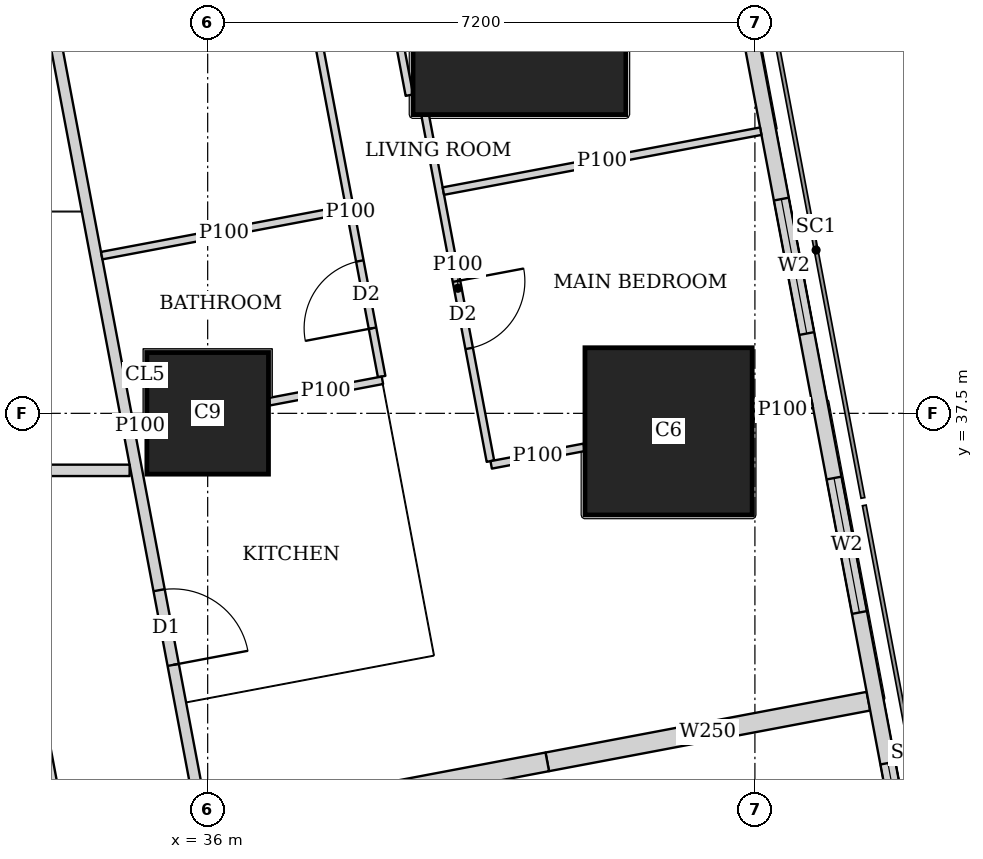
"""IFC4 building model, lengths in metres.
Left out: names, types, materials, properties, quantities, classifications, styles, units other than length and angle.
Written with IfcOpenShell. Run it as: python <this file> out.ifc"""

import sys

from ifc_helpers import new_model, si_unit, direction, frame, frame_2d, origin, origin_2d, place, context, subcontext, project, spatial, rectangle, extrude, element, fill, save


model = new_model("IFC4")
c1 = context("Model", 3, precision=1e-05, world=origin(), true_north=direction((0.0, 1.0)))
c2 = subcontext(c1, "Body", "Model", "MODEL_VIEW")
j1 = project(units=[si_unit("LENGTHUNIT", "METRE"), si_unit("PLANEANGLEUNIT", "RADIAN")], contexts=[c1])
p1 = place(None, origin())
s1 = spatial("IfcSite", under=j1, at=p1, CompositionType="ELEMENT")
p2 = place(p1, origin())
s2 = spatial("IfcBuilding", under=s1, at=p2, CompositionType="ELEMENT")
p3 = place(p2, frame((0.0, 0.0, 122.9)))
s3 = spatial("IfcBuildingStorey", under=s2, at=p3, CompositionType="ELEMENT", Elevation=122.9)
p4 = place(p3, frame((36.0, 37.5, 0.0), z_axis=(0.0, 0.0, 1.0), x_axis=(1.0, 0.0, 0.0)))
e1 = element("IfcColumn", 1, at=p4, inside=s3, PredefinedType="COLUMN", context=c2, shape_type="SweptSolid", body=[
    extrude(rectangle(XDim=1.6, YDim=1.6, at=origin_2d()), origin(), (0.0, 0.0, 1.0), 3.75),
])
p5 = place(p3, frame((42.064, 37.263, 0.0), z_axis=(0.0, 0.0, 1.0), x_axis=(1.0, 0.0, 0.0)))
e2 = element("IfcColumn", 2, at=p5, inside=s3, PredefinedType="COLUMN", context=c2, shape_type="SweptSolid", body=[
    extrude(rectangle(XDim=2.2, YDim=2.2, at=origin_2d()), origin(), (0.0, 0.0, 1.0), 3.75),
])
p6 = place(p3, frame((40.102, 42.83, 0.0), z_axis=(0.0, 0.0, 1.0), x_axis=(1.0, 0.0, 0.0)))
e3 = element("IfcColumn", 3, at=p6, inside=s3, PredefinedType="COLUMN", context=c2, shape_type="SweptSolid", body=[
    extrude(rectangle(XDim=2.8, YDim=2.8, at=origin_2d()), origin(), (0.0, 0.0, 1.0), 3.75),
])
p7 = place(p3, frame((50.653, 2.703, 0.0), z_axis=(0.0, 0.0, 1.0), x_axis=(-0.185612026696, 0.982623109613, 0.0)))
e4 = element("IfcWall", 4, at=p7, inside=s3, PredefinedType="SOLIDWALL", context=c2, shape_type="SweptSolid", body=[
    extrude(rectangle(XDim=41.393, YDim=0.2, at=frame_2d((20.697, 0.0))), origin(), (0.0, 0.0, 1.0), 3.5),
])
p8 = place(p7, frame((1.633, 0.0, 0.9)))
e5 = element("IfcOpeningElement", 5, at=p8, cuts=e4, PredefinedType="OPENING", context=c2, shape_type="SweptSolid", body=[
    extrude(rectangle(XDim=1.8, YDim=1.5, at=frame_2d((0.9, 0.75))), frame((0.0, 0.11, 0.0), z_axis=(0.0, -1.0, 0.0), x_axis=(1.0, 0.0, 0.0)), (0.0, 0.0, 1.0), 0.22),
])
p9 = place(p7, frame((6.032, 0.0, 0.9)))
e6 = element("IfcOpeningElement", 6, at=p9, cuts=e4, PredefinedType="OPENING", context=c2, shape_type="SweptSolid", body=[
    extrude(rectangle(XDim=1.8, YDim=1.5, at=frame_2d((0.9, 0.75))), frame((0.0, 0.11, 0.0), z_axis=(0.0, -1.0, 0.0), x_axis=(1.0, 0.0, 0.0)), (0.0, 0.0, 1.0), 0.22),
])
p10 = place(p7, frame((9.848, 0.0, 0.9)))
e7 = element("IfcOpeningElement", 7, at=p10, cuts=e4, PredefinedType="OPENING", context=c2, shape_type="SweptSolid", body=[
    extrude(rectangle(XDim=1.8, YDim=1.5, at=frame_2d((0.9, 0.75))), frame((0.0, 0.11, 0.0), z_axis=(0.0, -1.0, 0.0), x_axis=(1.0, 0.0, 0.0)), (0.0, 0.0, 1.0), 0.22),
])
p11 = place(p7, frame((13.664, 0.0, 0.9)))
e8 = element("IfcOpeningElement", 8, at=p11, cuts=e4, PredefinedType="OPENING", context=c2, shape_type="SweptSolid", body=[
    extrude(rectangle(XDim=1.8, YDim=1.5, at=frame_2d((0.9, 0.75))), frame((0.0, 0.11, 0.0), z_axis=(0.0, -1.0, 0.0), x_axis=(1.0, 0.0, 0.0)), (0.0, 0.0, 1.0), 0.22),
])
p12 = place(p7, frame((17.481, 0.0, 0.9)))
e9 = element("IfcOpeningElement", 9, at=p12, cuts=e4, PredefinedType="OPENING", context=c2, shape_type="SweptSolid", body=[
    extrude(rectangle(XDim=1.8, YDim=1.5, at=frame_2d((0.9, 0.75))), frame((0.0, 0.11, 0.0), z_axis=(0.0, -1.0, 0.0), x_axis=(1.0, 0.0, 0.0)), (0.0, 0.0, 1.0), 0.22),
])
p13 = place(p7, frame((21.297, 0.0, 0.9)))
e10 = element("IfcOpeningElement", 10, at=p13, cuts=e4, PredefinedType="OPENING", context=c2, shape_type="SweptSolid", body=[
    extrude(rectangle(XDim=1.8, YDim=1.5, at=frame_2d((0.9, 0.75))), frame((0.0, 0.11, 0.0), z_axis=(0.0, -1.0, 0.0), x_axis=(1.0, 0.0, 0.0)), (0.0, 0.0, 1.0), 0.22),
])
p14 = place(p7, frame((25.113, 0.0, 0.9)))
e11 = element("IfcOpeningElement", 11, at=p14, cuts=e4, PredefinedType="OPENING", context=c2, shape_type="SweptSolid", body=[
    extrude(rectangle(XDim=1.8, YDim=1.5, at=frame_2d((0.9, 0.75))), frame((0.0, 0.11, 0.0), z_axis=(0.0, -1.0, 0.0), x_axis=(1.0, 0.0, 0.0)), (0.0, 0.0, 1.0), 0.22),
])
p15 = place(p7, frame((28.93, 0.0, 0.9)))
e12 = element("IfcOpeningElement", 12, at=p15, cuts=e4, PredefinedType="OPENING", context=c2, shape_type="SweptSolid", body=[
    extrude(rectangle(XDim=1.8, YDim=1.5, at=frame_2d((0.9, 0.75))), frame((0.0, 0.11, 0.0), z_axis=(0.0, -1.0, 0.0), x_axis=(1.0, 0.0, 0.0)), (0.0, 0.0, 1.0), 0.22),
])
p16 = place(p7, frame((32.746, 0.0, 0.9)))
e13 = element("IfcOpeningElement", 13, at=p16, cuts=e4, PredefinedType="OPENING", context=c2, shape_type="SweptSolid", body=[
    extrude(rectangle(XDim=1.8, YDim=1.5, at=frame_2d((0.9, 0.75))), frame((0.0, 0.11, 0.0), z_axis=(0.0, -1.0, 0.0), x_axis=(1.0, 0.0, 0.0)), (0.0, 0.0, 1.0), 0.22),
])
p17 = place(p7, frame((36.481, 0.0, 0.9)))
e14 = element("IfcOpeningElement", 14, at=p17, cuts=e4, PredefinedType="OPENING", context=c2, shape_type="SweptSolid", body=[
    extrude(rectangle(XDim=1.8, YDim=1.5, at=frame_2d((0.9, 0.75))), frame((0.0, 0.11, 0.0), z_axis=(0.0, -1.0, 0.0), x_axis=(1.0, 0.0, 0.0)), (0.0, 0.0, 1.0), 0.22),
])
p18 = place(p3, frame((29.601, 36.75, 0.0), z_axis=(0.0, 0.0, 1.0), x_axis=(1.0, 0.0, 0.0)))
e15 = element("IfcWall", 15, at=p18, inside=s3, PredefinedType="SOLIDWALL", context=c2, shape_type="SweptSolid", body=[
    extrude(rectangle(XDim=5.372, YDim=0.15, at=frame_2d((2.686, 0.0))), origin(), (0.0, 0.0, 1.0), 3.5),
])
p19 = place(p18, frame((2.845, 0.0, 0.0)))
e16 = element("IfcOpeningElement", 16, at=p19, cuts=e15, PredefinedType="OPENING", context=c2, shape_type="SweptSolid", body=[
    extrude(rectangle(XDim=1.0, YDim=2.1, at=frame_2d((0.5, 1.05))), frame((0.0, 0.085, 0.0), z_axis=(0.0, -1.0, 0.0), x_axis=(1.0, 0.0, 0.0)), (0.0, 0.0, 1.0), 0.17),
])
p20 = place(p3, frame((33.382, 45.65, 0.0), z_axis=(0.0, 0.0, 1.0), x_axis=(0.185593544777, -0.982626600565, 0.0)))
e17 = element("IfcWall", 17, at=p20, inside=s3, PredefinedType="SOLIDWALL", context=c2, shape_type="SweptSolid", body=[
    extrude(rectangle(XDim=47.118, YDim=0.15, at=frame_2d((23.559, 0.0))), origin(), (0.0, 0.0, 1.0), 2.2),
])
p21 = place(p20, frame((10.662, 0.0, 0.0)))
e18 = element("IfcOpeningElement", 18, at=p21, cuts=e17, PredefinedType="OPENING", context=c2, shape_type="SweptSolid", body=[
    extrude(rectangle(XDim=1.0, YDim=2.1, at=frame_2d((0.5, 1.05))), frame((0.0, 0.085, 0.0), z_axis=(0.0, -1.0, 0.0), x_axis=(1.0, 0.0, 0.0)), (0.0, 0.0, 1.0), 0.17),
])
p22 = place(p20, frame((15.237, 0.0, 0.0)))
e19 = element("IfcOpeningElement", 19, at=p22, cuts=e17, PredefinedType="OPENING", context=c2, shape_type="SweptSolid", body=[
    extrude(rectangle(XDim=1.0, YDim=2.1, at=frame_2d((0.5, 1.05))), frame((0.0, 0.085, 0.0), z_axis=(0.0, -1.0, 0.0), x_axis=(1.0, 0.0, 0.0)), (0.0, 0.0, 1.0), 0.17),
])
p23 = place(p20, frame((22.87, 0.0, 0.0)))
e20 = element("IfcOpeningElement", 20, at=p23, cuts=e17, PredefinedType="OPENING", context=c2, shape_type="SweptSolid", body=[
    extrude(rectangle(XDim=1.0, YDim=2.1, at=frame_2d((0.5, 1.05))), frame((0.0, 0.085, 0.0), z_axis=(0.0, -1.0, 0.0), x_axis=(1.0, 0.0, 0.0)), (0.0, 0.0, 1.0), 0.17),
])
p24 = place(p20, frame((33.833, 0.0, 0.0)))
e21 = element("IfcOpeningElement", 21, at=p24, cuts=e17, PredefinedType="OPENING", context=c2, shape_type="SweptSolid", body=[
    extrude(rectangle(XDim=1.0, YDim=2.1, at=frame_2d((0.5, 1.05))), frame((0.0, 0.085, 0.0), z_axis=(0.0, -1.0, 0.0), x_axis=(1.0, 0.0, 0.0)), (0.0, 0.0, 1.0), 0.17),
])
p25 = place(p3, frame((38.654, 41.686, 0.0), z_axis=(0.0, 0.0, 1.0), x_axis=(-0.185676896978, 0.982610853761, 0.0)))
e22 = element("IfcWall", 22, at=p25, inside=s3, PredefinedType="PARTITIONING", context=c2, shape_type="SweptSolid", body=[
    extrude(rectangle(XDim=4.034, YDim=0.1, at=frame_2d((2.017, 0.0))), origin(), (0.0, 0.0, 1.0), 2.05),
])
p26 = place(p3, frame((38.862, 41.42, 0.0), z_axis=(0.0, 0.0, 1.0), x_axis=(0.185332907641, -0.982675792592, 0.0)))
e23 = element("IfcWall", 23, at=p26, inside=s3, PredefinedType="PARTITIONING", context=c2, shape_type="SweptSolid", body=[
    extrude(rectangle(XDim=4.629, YDim=0.1, at=frame_2d((2.314, 0.0))), origin(), (0.0, 0.0, 1.0), 3.5),
])
p27 = place(p26, frame((2.22, 0.0, 0.0)))
e24 = element("IfcOpeningElement", 24, at=p27, cuts=e23, PredefinedType="OPENING", context=c2, shape_type="SweptSolid", body=[
    extrude(rectangle(XDim=0.9, YDim=2.1, at=frame_2d((0.45, 1.05))), frame((0.0, 0.06, 0.0), z_axis=(0.0, -1.0, 0.0), x_axis=(1.0, 0.0, 0.0)), (0.0, 0.0, 1.0), 0.12),
])
p28 = place(p3, frame((37.472, 42.309, 0.0), z_axis=(0.0, 0.0, 1.0), x_axis=(0.185641287362, -0.982617581985, 0.0)))
e25 = element("IfcWall", 25, at=p28, inside=s3, PredefinedType="PARTITIONING", context=c2, shape_type="SweptSolid", body=[
    extrude(rectangle(XDim=4.402, YDim=0.1, at=frame_2d((2.201, 0.0))), origin(), (0.0, 0.0, 1.0), 3.5),
])
p29 = place(p28, frame((2.854, 0.0, 0.0)))
e26 = element("IfcOpeningElement", 26, at=p29, cuts=e25, PredefinedType="OPENING", context=c2, shape_type="SweptSolid", body=[
    extrude(rectangle(XDim=0.9, YDim=2.1, at=frame_2d((0.45, 1.05))), frame((0.0, 0.06, 0.0), z_axis=(0.0, -1.0, 0.0), x_axis=(1.0, 0.0, 0.0)), (0.0, 0.0, 1.0), 0.12),
])
p30 = place(p3, frame((43.277, 41.212, 0.0), z_axis=(0.0, 0.0, 1.0), x_axis=(-0.982665405803, -0.185387972203, 0.0)))
e27 = element("IfcWall", 27, at=p30, inside=s3, PredefinedType="PARTITIONING", context=c2, shape_type="SweptSolid", body=[
    extrude(rectangle(XDim=4.25, YDim=0.1, at=frame_2d((2.125, 0.0))), origin(), (0.0, 0.0, 1.0), 2.05),
])
p31 = place(p3, frame((43.955, 37.62, 0.0), z_axis=(0.0, 0.0, 1.0), x_axis=(-0.98247004097, -0.186420542316, 0.0)))
e28 = element("IfcWall", 28, at=p31, inside=s3, PredefinedType="PARTITIONING", context=c2, shape_type="SweptSolid", body=[
    extrude(rectangle(XDim=0.795, YDim=0.1, at=frame_2d((0.397, 0.0))), origin(), (0.0, 0.0, 1.0), 2.05),
])
p32 = place(p3, frame((40.954, 37.053, 0.0), z_axis=(0.0, 0.0, 1.0), x_axis=(-0.982663001154, -0.185400717808, 0.0)))
e29 = element("IfcWall", 29, at=p32, inside=s3, PredefinedType="PARTITIONING", context=c2, shape_type="SweptSolid", body=[
    extrude(rectangle(XDim=1.246, YDim=0.1, at=frame_2d((0.623, 0.0))), origin(), (0.0, 0.0, 1.0), 2.05),
])
p33 = place(p3, frame((37.823, 40.182, 0.0), z_axis=(0.0, 0.0, 1.0), x_axis=(-0.982664729897, -0.18539155487, 0.0)))
e30 = element("IfcWall", 30, at=p33, inside=s3, PredefinedType="PARTITIONING", context=c2, shape_type="SweptSolid", body=[
    extrude(rectangle(XDim=3.274, YDim=0.1, at=frame_2d((1.637, 0.0))), origin(), (0.0, 0.0, 1.0), 3.5),
])
p34 = place(p3, frame((38.299, 37.935, 0.0), z_axis=(0.0, 0.0, 1.0), x_axis=(-0.982536828695, -0.186068213993, 0.0)))
e31 = element("IfcWall", 31, at=p34, inside=s3, PredefinedType="PARTITIONING", context=c2, shape_type="SweptSolid", body=[
    extrude(rectangle(XDim=1.515, YDim=0.1, at=frame_2d((0.758, 0.0))), origin(), (0.0, 0.0, 1.0), 3.5),
])
p35 = place(p3, frame((35.19, 37.347, 0.0), z_axis=(0.0, 0.0, 1.0), x_axis=(-0.982404955251, -0.186763229514, 0.0)))
e32 = element("IfcWall", 32, at=p35, inside=s3, PredefinedType="PARTITIONING", context=c2, shape_type="SweptSolid", body=[
    extrude(rectangle(XDim=0.161, YDim=0.1, at=frame_2d((0.081, 0.0))), origin(), (0.0, 0.0, 1.0), 3.5),
])
p36 = place(p3, frame((44.693, 33.713, 0.0), z_axis=(0.0, 0.0, 1.0), x_axis=(-0.982633535512, -0.185556823879, 0.0)))
e33 = element("IfcWall", 33, at=p36, inside=s3, PredefinedType="SOLIDWALL", context=c2, shape_type="SweptSolid", body=[
    extrude(rectangle(XDim=4.3, YDim=0.25, at=frame_2d((2.15, 0.0))), origin(), (0.0, 0.0, 1.0), 2.2),
])
p37 = place(p3, frame((40.468, 32.915, 0.0), z_axis=(0.0, 0.0, 1.0), x_axis=(-0.982612837616, -0.185666398014, 0.0)))
e34 = element("IfcWall", 34, at=p37, inside=s3, PredefinedType="SOLIDWALL", context=c2, shape_type="SweptSolid", body=[
    extrude(rectangle(XDim=4.525, YDim=0.25, at=frame_2d((2.262, 0.0))), origin(), (0.0, 0.0, 1.0), 3.5),
])
p38 = place(p3, frame((38.202, 10.163, 0.0), z_axis=(0.0, 0.0, 1.0), x_axis=(-0.185610321132, 0.982623431783, 0.0)))
e35 = element("IfcWall", 35, at=p38, inside=s3, PredefinedType="PARTITIONING", context=c2, shape_type="SweptSolid", body=[
    extrude(rectangle(XDim=25.111, YDim=0.125, at=frame_2d((12.556, 0.0))), origin(), (0.0, 0.0, 1.0), 2.5),
])
p39 = place(p38, frame((0.708, 0.0, 0.0)))
e36 = element("IfcOpeningElement", 36, at=p39, cuts=e35, PredefinedType="OPENING", context=c2, shape_type="SweptSolid", body=[
    extrude(rectangle(XDim=1.0, YDim=2.1, at=frame_2d((0.5, 1.05))), frame((0.0, 0.073, 0.0), z_axis=(0.0, -1.0, 0.0), x_axis=(1.0, 0.0, 0.0)), (0.0, 0.0, 1.0), 0.145),
])
p40 = place(p38, frame((13.378, 0.0, 0.0)))
e37 = element("IfcOpeningElement", 37, at=p40, cuts=e35, PredefinedType="OPENING", context=c2, shape_type="SweptSolid", body=[
    extrude(rectangle(XDim=1.0, YDim=2.1, at=frame_2d((0.5, 1.05))), frame((0.0, 0.073, 0.0), z_axis=(0.0, -1.0, 0.0), x_axis=(1.0, 0.0, 0.0)), (0.0, 0.0, 1.0), 0.145),
])
p41 = place(p38, frame((21.25, 0.0, 0.0)))
e38 = element("IfcOpeningElement", 38, at=p41, cuts=e35, PredefinedType="OPENING", context=c2, shape_type="SweptSolid", body=[
    extrude(rectangle(XDim=1.0, YDim=2.1, at=frame_2d((0.5, 1.05))), frame((0.0, 0.073, 0.0), z_axis=(0.0, -1.0, 0.0), x_axis=(1.0, 0.0, 0.0)), (0.0, 0.0, 1.0), 0.145),
])
p42 = place(p38, frame((23.453, 0.0, 0.0)))
e39 = element("IfcOpeningElement", 39, at=p42, cuts=e35, PredefinedType="OPENING", context=c2, shape_type="SweptSolid", body=[
    extrude(rectangle(XDim=1.0, YDim=2.1, at=frame_2d((0.5, 1.05))), frame((0.0, 0.073, 0.0), z_axis=(0.0, -1.0, 0.0), x_axis=(1.0, 0.0, 0.0)), (0.0, 0.0, 1.0), 0.145),
])
p43 = place(p15, origin())
e40 = element("IfcWindow", 40, at=p43, inside=s3, PartitioningType="SINGLE_PANEL", PredefinedType="WINDOW", context=c2, shape_type="SweptSolid", body=[
    extrude(rectangle(XDim=1.8, YDim=1.5, at=frame_2d((0.9, 0.75))), frame((0.0, 0.03, 0.0), z_axis=(0.0, -1.0, 0.0), x_axis=(1.0, 0.0, 0.0)), (0.0, 0.0, 1.0), 0.06),
])
fill(e12, e40)
p44 = place(p16, origin())
e41 = element("IfcWindow", 41, at=p44, inside=s3, PartitioningType="SINGLE_PANEL", PredefinedType="WINDOW", context=c2, shape_type="SweptSolid", body=[
    extrude(rectangle(XDim=1.8, YDim=1.5, at=frame_2d((0.9, 0.75))), frame((0.0, 0.03, 0.0), z_axis=(0.0, -1.0, 0.0), x_axis=(1.0, 0.0, 0.0)), (0.0, 0.0, 1.0), 0.06),
])
fill(e13, e41)
p45 = place(p17, origin())
e42 = element("IfcWindow", 42, at=p45, inside=s3, PartitioningType="SINGLE_PANEL", PredefinedType="WINDOW", context=c2, shape_type="SweptSolid", body=[
    extrude(rectangle(XDim=1.8, YDim=1.5, at=frame_2d((0.9, 0.75))), frame((0.0, 0.03, 0.0), z_axis=(0.0, -1.0, 0.0), x_axis=(1.0, 0.0, 0.0)), (0.0, 0.0, 1.0), 0.06),
])
fill(e14, e42)
p46 = place(p27, origin())
e43 = element("IfcDoor", 43, at=p46, inside=s3, OperationType="SINGLE_SWING_LEFT", PredefinedType="DOOR", context=c2, shape_type="SweptSolid", body=[
    extrude(rectangle(XDim=0.9, YDim=2.1, at=frame_2d((0.45, 1.05))), frame((0.0, 0.025, 0.0), z_axis=(0.0, -1.0, 0.0), x_axis=(1.0, 0.0, 0.0)), (0.0, 0.0, 1.0), 0.05),
])
fill(e24, e43)
p47 = place(p29, origin())
e44 = element("IfcDoor", 44, at=p47, inside=s3, OperationType="SINGLE_SWING_LEFT", PredefinedType="DOOR", context=c2, shape_type="SweptSolid", body=[
    extrude(rectangle(XDim=0.9, YDim=2.1, at=frame_2d((0.45, 1.05))), frame((0.0, 0.025, 0.0), z_axis=(0.0, -1.0, 0.0), x_axis=(1.0, 0.0, 0.0)), (0.0, 0.0, 1.0), 0.05),
])
fill(e26, e44)
p48 = place(p21, origin())
e45 = element("IfcDoor", 45, at=p48, inside=s3, OperationType="SINGLE_SWING_RIGHT", PredefinedType="DOOR", context=c2, shape_type="SweptSolid", body=[
    extrude(rectangle(XDim=1.0, YDim=2.1, at=frame_2d((0.5, 1.05))), frame((0.0, 0.025, 0.0), z_axis=(0.0, -1.0, 0.0), x_axis=(1.0, 0.0, 0.0)), (0.0, 0.0, 1.0), 0.05),
])
fill(e18, e45)
save(model, sys.argv[1])
